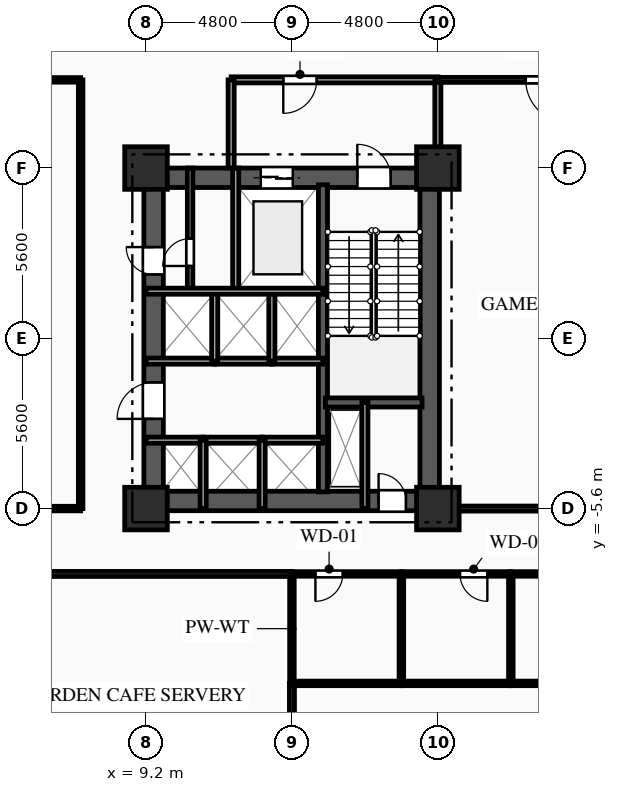
"""IFC4 building model, lengths in metres.
Left out: names, types, materials, properties, quantities, classifications, styles, units other than length and angle.
Written with IfcOpenShell. Run it as: python <this file> out.ifc"""

import sys

from ifc_helpers import new_model, si_unit, direction, frame, frame_2d, origin, origin_2d, place, context, subcontext, project, spatial, rectangle, extrude, element, fill, save


model = new_model("IFC4")
c1 = context("Model", 3, precision=1e-05, world=origin(), true_north=direction((0.0, 1.0)))
c2 = subcontext(c1, "Body", "Model", "MODEL_VIEW")
j1 = project(units=[si_unit("LENGTHUNIT", "METRE"), si_unit("PLANEANGLEUNIT", "RADIAN")], contexts=[c1])
p1 = place(None, origin())
s1 = spatial("IfcSite", under=j1, at=p1, CompositionType="ELEMENT")
p2 = place(p1, origin())
s2 = spatial("IfcBuilding", under=s1, at=p2, CompositionType="ELEMENT")
p3 = place(p2, frame((0.0, 0.0, 13.5)))
s3 = spatial("IfcBuildingStorey", under=s2, at=p3, CompositionType="ELEMENT", Elevation=13.5)
for number, where, z_axis, x_axis in (
    (1, (9.2, -5.6, 0.0), (0.0, 0.0, 1.0), (1.0, 0.0, 0.0)),
    (2, (9.2, 5.6, 0.0), (0.0, 0.0, 1.0), (1.0, 0.0, 0.0)),
    (3, (18.8, -5.6, 0.0), (0.0, 0.0, 1.0), (1.0, 0.0, 0.0)),
    (4, (18.8, 5.6, 0.0), (0.0, 0.0, 1.0), (1.0, 0.0, 0.0)),
):
    element("IfcColumn", number, at=place(p3, frame(where, z_axis=z_axis, x_axis=x_axis)), inside=s3, PredefinedType="COLUMN", context=c2, shape_type="SweptSolid", body=[
        extrude(rectangle(XDim=1.4, YDim=1.4, at=origin_2d()), origin(), (0.0, 0.0, 1.0), 4.5),
    ])
p4 = place(p3, frame((9.2, 5.28, 0.0), z_axis=(0.0, 0.0, 1.0), x_axis=(1.0, 0.0, 0.0)))
e5 = element("IfcWall", 5, at=p4, inside=s3, PredefinedType="SHEAR", context=c2, shape_type="SweptSolid", body=[
    extrude(rectangle(XDim=9.6, YDim=0.64, at=frame_2d((4.8, 0.0))), origin(), (0.0, 0.0, 1.0), 4.17),
])
p5 = place(p4, frame((6.95, 0.0, 0.0)))
e6 = element("IfcOpeningElement", 6, at=p5, cuts=e5, PredefinedType="OPENING", context=c2, shape_type="SweptSolid", body=[
    extrude(rectangle(XDim=1.1, YDim=2.15, at=frame_2d((0.55, 1.075))), frame((0.0, 0.33, 0.0), z_axis=(0.0, -1.0, 0.0), x_axis=(1.0, 0.0, 0.0)), (0.0, 0.0, 1.0), 0.66),
])
p6 = place(p4, frame((3.775, 0.0, 0.0)))
e7 = element("IfcOpeningElement", 7, at=p6, cuts=e5, PredefinedType="OPENING", context=c2, shape_type="SweptSolid", body=[
    extrude(rectangle(XDim=1.05, YDim=2.1, at=frame_2d((0.525, 1.05))), frame((0.0, 0.33, 0.0), z_axis=(0.0, -1.0, 0.0), x_axis=(1.0, 0.0, 0.0)), (0.0, 0.0, 1.0), 0.66),
])
p7 = place(p3, frame((9.2, -5.35, 0.0), z_axis=(0.0, 0.0, 1.0), x_axis=(1.0, 0.0, 0.0)))
e8 = element("IfcWall", 8, at=p7, inside=s3, PredefinedType="SHEAR", context=c2, shape_type="SweptSolid", body=[
    extrude(rectangle(XDim=9.6, YDim=0.64, at=frame_2d((4.8, 0.0))), origin(), (0.0, 0.0, 1.0), 4.17),
])
p8 = place(p7, frame((7.65, 0.0, 0.0)))
e9 = element("IfcOpeningElement", 9, at=p8, cuts=e8, PredefinedType="OPENING", context=c2, shape_type="SweptSolid", body=[
    extrude(rectangle(XDim=0.9, YDim=2.1, at=frame_2d((0.45, 1.05))), frame((0.0, 0.33, 0.0), z_axis=(0.0, -1.0, 0.0), x_axis=(1.0, 0.0, 0.0)), (0.0, 0.0, 1.0), 0.66),
])
p9 = place(p3, frame((9.45, -5.05, 0.0), z_axis=(0.0, 0.0, 1.0), x_axis=(0.0, 1.0, 0.0)))
e10 = element("IfcWall", 10, at=p9, inside=s3, PredefinedType="SHEAR", context=c2, shape_type="SweptSolid", body=[
    extrude(rectangle(XDim=10.1, YDim=0.64, at=frame_2d((5.05, 0.0))), origin(), (0.0, 0.0, 1.0), 4.17),
])
p10 = place(p9, frame((7.15, 0.0, 0.0)))
e11 = element("IfcOpeningElement", 11, at=p10, cuts=e10, PredefinedType="OPENING", context=c2, shape_type="SweptSolid", body=[
    extrude(rectangle(XDim=0.9, YDim=2.1, at=frame_2d((0.45, 1.05))), frame((0.0, 0.33, 0.0), z_axis=(0.0, -1.0, 0.0), x_axis=(1.0, 0.0, 0.0)), (0.0, 0.0, 1.0), 0.66),
])
p11 = place(p9, frame((2.4, 0.0, 0.0)))
e12 = element("IfcOpeningElement", 12, at=p11, cuts=e10, PredefinedType="OPENING", context=c2, shape_type="SweptSolid", body=[
    extrude(rectangle(XDim=1.2, YDim=2.15, at=frame_2d((0.6, 1.075))), frame((0.0, 0.33, 0.0), z_axis=(0.0, -1.0, 0.0), x_axis=(1.0, 0.0, 0.0)), (0.0, 0.0, 1.0), 0.66),
])
p12 = place(p3, frame((18.53, -5.05, 0.0), z_axis=(0.0, 0.0, 1.0), x_axis=(0.0, 1.0, 0.0)))
e13 = element("IfcWall", 13, at=p12, inside=s3, PredefinedType="SHEAR", context=c2, shape_type="SweptSolid", body=[
    extrude(rectangle(XDim=10.1, YDim=0.64, at=frame_2d((5.05, 0.0))), origin(), (0.0, 0.0, 1.0), 4.17),
])
p13 = place(p3, frame((15.02, -5.05, 0.0), z_axis=(0.0, 0.0, 1.0), x_axis=(0.0, 1.0, 0.0)))
e14 = element("IfcWall", 14, at=p13, inside=s3, PredefinedType="SHEAR", context=c2, shape_type="SweptSolid", body=[
    extrude(rectangle(XDim=10.1, YDim=0.3, at=frame_2d((5.05, 0.0))), origin(), (0.0, 0.0, 1.0), 4.17),
])
p14 = place(p3, frame((15.1, -2.11, 0.0), z_axis=(0.0, 0.0, 1.0), x_axis=(1.0, 0.0, 0.0)))
e15 = element("IfcWall", 15, at=p14, inside=s3, PredefinedType="SHEAR", context=c2, shape_type="SweptSolid", body=[
    extrude(rectangle(XDim=3.18, YDim=0.3, at=frame_2d((1.59, 0.0))), origin(), (0.0, 0.0, 1.0), 4.17),
])
p15 = place(p3, frame((16.4, -2.11, 0.0), z_axis=(0.0, 0.0, 1.0), x_axis=(0.0, -1.0, 0.0)))
e16 = element("IfcWall", 16, at=p15, inside=s3, PredefinedType="PARTITIONING", context=c2, shape_type="SweptSolid", body=[
    extrude(rectangle(XDim=3.49, YDim=0.2, at=frame_2d((1.745, 0.0))), origin(), (0.0, 0.0, 1.0), 4.17),
])
p16 = place(p3, frame((12.15, 5.6, 0.0), z_axis=(0.0, 0.0, 1.0), x_axis=(0.0, -1.0, 0.0)))
e17 = element("IfcWall", 17, at=p16, inside=s3, PredefinedType="PARTITIONING", context=c2, shape_type="SweptSolid", body=[
    extrude(rectangle(XDim=4.05, YDim=0.2, at=frame_2d((2.025, 0.0))), origin(), (0.0, 0.0, 1.0), 4.17),
])
p17 = place(p3, frame((18.8, 8.5, 0.0), z_axis=(0.0, 0.0, 1.0), x_axis=(-1.0, 0.0, 0.0)))
e18 = element("IfcWall", 18, at=p17, inside=s3, PredefinedType="PARTITIONING", context=c2, shape_type="SweptSolid", body=[
    extrude(rectangle(XDim=6.8, YDim=0.2, at=frame_2d((3.4, 0.0))), origin(), (0.0, 0.0, 1.0), 4.17),
])
p18 = place(p17, frame((3.985, 0.0, 0.0)))
e19 = element("IfcOpeningElement", 19, at=p18, cuts=e18, PredefinedType="OPENING", context=c2, shape_type="SweptSolid", body=[
    extrude(rectangle(XDim=1.1, YDim=2.15, at=frame_2d((0.55, 1.075))), frame((0.0, 0.11, 0.0), z_axis=(0.0, -1.0, 0.0), x_axis=(1.0, 0.0, 0.0)), (0.0, 0.0, 1.0), 0.22),
])
p19 = place(p3, frame((12.0, 8.5, 0.0), z_axis=(0.0, 0.0, 1.0), x_axis=(0.0, -1.0, 0.0)))
e20 = element("IfcWall", 20, at=p19, inside=s3, PredefinedType="PARTITIONING", context=c2, shape_type="SweptSolid", body=[
    extrude(rectangle(XDim=2.9, YDim=0.2, at=frame_2d((1.45, 0.0))), origin(), (0.0, 0.0, 1.0), 4.17),
])
p20 = place(p3, frame((18.8, 5.6, 0.0), z_axis=(0.0, 0.0, 1.0), x_axis=(0.0, 1.0, 0.0)))
e21 = element("IfcWall", 21, at=p20, inside=s3, PredefinedType="PARTITIONING", context=c2, shape_type="SweptSolid", body=[
    extrude(rectangle(XDim=2.9, YDim=0.2, at=frame_2d((1.45, 0.0))), origin(), (0.0, 0.0, 1.0), 3.655),
])
p21 = place(p3, frame((10.65, 1.55, 0.0), z_axis=(0.0, 0.0, 1.0), x_axis=(0.0, 1.0, 0.0)))
e22 = element("IfcWall", 22, at=p21, inside=s3, PredefinedType="PARTITIONING", context=c2, shape_type="SweptSolid", body=[
    extrude(rectangle(XDim=4.05, YDim=0.18, at=frame_2d((2.025, 0.0))), origin(), (0.0, 0.0, 1.0), 4.17),
])
p22 = place(p21, frame((0.829, 0.0, 0.0)))
e23 = element("IfcOpeningElement", 23, at=p22, cuts=e22, PredefinedType="OPENING", context=c2, shape_type="SweptSolid", body=[
    extrude(rectangle(XDim=0.9, YDim=2.1, at=frame_2d((0.45, 1.05))), frame((0.0, 0.1, 0.0), z_axis=(0.0, -1.0, 0.0), x_axis=(1.0, 0.0, 0.0)), (0.0, 0.0, 1.0), 0.2),
])
p23 = place(p3, frame((9.2, -3.35, 0.0), z_axis=(0.0, 0.0, 1.0), x_axis=(1.0, 0.0, 0.0)))
e24 = element("IfcWall", 24, at=p23, inside=s3, PredefinedType="PARTITIONING", context=c2, shape_type="SweptSolid", body=[
    extrude(rectangle(XDim=1.88, YDim=0.2, at=frame_2d((0.94, 0.0))), origin(), (0.0, 0.0, 1.0), 3.885),
])
p24 = place(p3, frame((11.08, -3.35, 0.0), z_axis=(0.0, 0.0, 1.0), x_axis=(1.0, 0.0, 0.0)))
e25 = element("IfcWall", 25, at=p24, inside=s3, PredefinedType="PARTITIONING", context=c2, shape_type="SweptSolid", body=[
    extrude(rectangle(XDim=1.94, YDim=0.2, at=frame_2d((0.97, 0.0))), origin(), (0.0, 0.0, 1.0), 4.17),
])
p25 = place(p3, frame((13.02, -3.35, 0.0), z_axis=(0.0, 0.0, 1.0), x_axis=(1.0, 0.0, 0.0)))
e26 = element("IfcWall", 26, at=p25, inside=s3, PredefinedType="PARTITIONING", context=c2, shape_type="SweptSolid", body=[
    extrude(rectangle(XDim=2.0, YDim=0.2, at=frame_2d((1.0, 0.0))), origin(), (0.0, 0.0, 1.0), 4.17),
])
p26 = place(p3, frame((11.46, -0.75, 0.0), z_axis=(0.0, 0.0, 1.0), x_axis=(-1.0, 0.0, 0.0)))
e27 = element("IfcWall", 27, at=p26, inside=s3, PredefinedType="PARTITIONING", context=c2, shape_type="SweptSolid", body=[
    extrude(rectangle(XDim=2.26, YDim=0.2, at=frame_2d((1.13, 0.0))), origin(), (0.0, 0.0, 1.0), 4.17),
])
p27 = place(p3, frame((13.34, -0.75, 0.0), z_axis=(0.0, 0.0, 1.0), x_axis=(-1.0, 0.0, 0.0)))
e28 = element("IfcWall", 28, at=p27, inside=s3, PredefinedType="PARTITIONING", context=c2, shape_type="SweptSolid", body=[
    extrude(rectangle(XDim=1.88, YDim=0.2, at=frame_2d((0.94, 0.0))), origin(), (0.0, 0.0, 1.0), 4.17),
])
p28 = place(p3, frame((15.02, -0.75, 0.0), z_axis=(0.0, 0.0, 1.0), x_axis=(-1.0, 0.0, 0.0)))
e29 = element("IfcWall", 29, at=p28, inside=s3, PredefinedType="PARTITIONING", context=c2, shape_type="SweptSolid", body=[
    extrude(rectangle(XDim=1.68, YDim=0.2, at=frame_2d((0.84, 0.0))), origin(), (0.0, 0.0, 1.0), 4.17),
])
for number, where, z_axis, x_axis in (
    (30, (11.08, -5.6, 0.0), (0.0, 0.0, 1.0), (0.0, 1.0, 0.0)),
    (31, (13.02, -5.6, 0.0), (0.0, 0.0, 1.0), (0.0, 1.0, 0.0)),
):
    element("IfcWall", number, at=place(p3, frame(where, z_axis=z_axis, x_axis=x_axis)), inside=s3, PredefinedType="PARTITIONING", context=c2, shape_type="SweptSolid", body=[
        extrude(rectangle(XDim=2.25, YDim=0.2, at=frame_2d((1.125, 0.0))), origin(), (0.0, 0.0, 1.0), 4.17),
    ])
for number, where, z_axis, x_axis in (
    (32, (11.46, -0.75, 0.0), (0.0, 0.0, 1.0), (0.0, 1.0, 0.0)),
    (33, (13.34, -0.75, 0.0), (0.0, 0.0, 1.0), (0.0, 1.0, 0.0)),
):
    element("IfcWall", number, at=place(p3, frame(where, z_axis=z_axis, x_axis=x_axis)), inside=s3, PredefinedType="PARTITIONING", context=c2, shape_type="SweptSolid", body=[
        extrude(rectangle(XDim=2.3, YDim=0.2, at=frame_2d((1.15, 0.0))), origin(), (0.0, 0.0, 1.0), 4.17),
    ])
p29 = place(p3, frame((7.05, 8.5, 0.0), z_axis=(0.0, 0.0, 1.0), x_axis=(-1.0, 0.0, 0.0)))
e34 = element("IfcWall", 34, at=p29, inside=s3, PredefinedType="PARTITIONING", context=c2, shape_type="SweptSolid", body=[
    extrude(rectangle(XDim=7.05, YDim=0.15, at=frame_2d((3.525, 0.0))), origin(), (0.0, 0.0, 1.0), 4.17),
])
p30 = place(p3, frame((24.0, 8.5, 0.0), z_axis=(0.0, 0.0, 1.0), x_axis=(-1.0, 0.0, 0.0)))
e35 = element("IfcWall", 35, at=p30, inside=s3, PredefinedType="PARTITIONING", context=c2, shape_type="SweptSolid", body=[
    extrude(rectangle(XDim=5.2, YDim=0.165, at=frame_2d((2.6, 0.0))), origin(), (0.0, 0.0, 1.0), 4.17),
])
p31 = place(p30, frame((0.91, 0.0, 0.0)))
e36 = element("IfcOpeningElement", 36, at=p31, cuts=e35, PredefinedType="OPENING", context=c2, shape_type="SweptSolid", body=[
    extrude(rectangle(XDim=1.4, YDim=2.3, at=frame_2d((0.7, 1.15))), frame((0.0, 0.093, 0.0), z_axis=(0.0, -1.0, 0.0), x_axis=(1.0, 0.0, 0.0)), (0.0, 0.0, 1.0), 0.185),
])
p32 = place(p3, frame((14.0, -7.75, 0.0), z_axis=(0.0, 0.0, 1.0), x_axis=(-1.0, 0.0, 0.0)))
e37 = element("IfcWall", 37, at=p32, inside=s3, PredefinedType="PARTITIONING", context=c2, shape_type="SweptSolid", body=[
    extrude(rectangle(XDim=14.0, YDim=0.165, at=frame_2d((7.0, 0.0))), origin(), (0.0, 0.0, 1.0), 4.17),
])
p33 = place(p32, frame((10.809, 0.0, 0.0)))
e38 = element("IfcOpeningElement", 38, at=p33, cuts=e37, PredefinedType="OPENING", context=c2, shape_type="SweptSolid", body=[
    extrude(rectangle(XDim=1.15, YDim=2.15, at=frame_2d((0.575, 1.075))), frame((0.0, 0.093, 0.0), z_axis=(0.0, -1.0, 0.0), x_axis=(1.0, 0.0, 0.0)), (0.0, 0.0, 1.0), 0.185),
])
p34 = place(p3, frame((17.6, -7.75, 0.0), z_axis=(0.0, 0.0, 1.0), x_axis=(-1.0, 0.0, 0.0)))
e39 = element("IfcWall", 39, at=p34, inside=s3, PredefinedType="PLUMBINGWALL", context=c2, shape_type="SweptSolid", body=[
    extrude(rectangle(XDim=3.6, YDim=0.15, at=frame_2d((1.8, 0.0))), origin(), (0.0, 0.0, 1.0), 4.17),
])
p35 = place(p34, frame((1.927, 0.0, 0.0)))
e40 = element("IfcOpeningElement", 40, at=p35, cuts=e39, PredefinedType="OPENING", context=c2, shape_type="SweptSolid", body=[
    extrude(rectangle(XDim=0.9, YDim=2.1, at=frame_2d((0.45, 1.05))), frame((0.0, 0.085, 0.0), z_axis=(0.0, -1.0, 0.0), x_axis=(1.0, 0.0, 0.0)), (0.0, 0.0, 1.0), 0.17),
])
p36 = place(p3, frame((21.2, -7.75, 0.0), z_axis=(0.0, 0.0, 1.0), x_axis=(-1.0, 0.0, 0.0)))
e41 = element("IfcWall", 41, at=p36, inside=s3, PredefinedType="PLUMBINGWALL", context=c2, shape_type="SweptSolid", body=[
    extrude(rectangle(XDim=3.6, YDim=0.15, at=frame_2d((1.8, 0.0))), origin(), (0.0, 0.0, 1.0), 4.17),
])
p37 = place(p36, frame((0.772, 0.0, 0.0)))
e42 = element("IfcOpeningElement", 42, at=p37, cuts=e41, PredefinedType="OPENING", context=c2, shape_type="SweptSolid", body=[
    extrude(rectangle(XDim=0.9, YDim=2.1, at=frame_2d((0.45, 1.05))), frame((0.0, 0.085, 0.0), z_axis=(0.0, -1.0, 0.0), x_axis=(1.0, 0.0, 0.0)), (0.0, 0.0, 1.0), 0.17),
])
p38 = place(p3, frame((24.0, -7.75, 0.0), z_axis=(0.0, 0.0, 1.0), x_axis=(-1.0, 0.0, 0.0)))
e43 = element("IfcWall", 43, at=p38, inside=s3, PredefinedType="PARTITIONING", context=c2, shape_type="SweptSolid", body=[
    extrude(rectangle(XDim=2.8, YDim=0.15, at=frame_2d((1.4, 0.0))), origin(), (0.0, 0.0, 1.0), 4.17),
])
p39 = place(p38, frame((0.666, 0.0, 0.0)))
e44 = element("IfcOpeningElement", 44, at=p39, cuts=e43, PredefinedType="OPENING", context=c2, shape_type="SweptSolid", body=[
    extrude(rectangle(XDim=0.95, YDim=2.1, at=frame_2d((0.475, 1.05))), frame((0.0, 0.085, 0.0), z_axis=(0.0, -1.0, 0.0), x_axis=(1.0, 0.0, 0.0)), (0.0, 0.0, 1.0), 0.17),
])
p40 = place(p3, frame((0.0, -5.6, 0.0), z_axis=(0.0, 0.0, 1.0), x_axis=(1.0, 0.0, 0.0)))
e45 = element("IfcWall", 45, at=p40, inside=s3, PredefinedType="PARTITIONING", context=c2, shape_type="SweptSolid", body=[
    extrude(rectangle(XDim=7.05, YDim=0.15, at=frame_2d((3.525, 0.0))), origin(), (0.0, 0.0, 1.0), 3.655),
])
p41 = place(p3, frame((18.8, -5.6, 0.0), z_axis=(0.0, 0.0, 1.0), x_axis=(1.0, 0.0, 0.0)))
e46 = element("IfcWall", 46, at=p41, inside=s3, PredefinedType="PARTITIONING", context=c2, shape_type="SweptSolid", body=[
    extrude(rectangle(XDim=5.2, YDim=0.165, at=frame_2d((2.6, 0.0))), origin(), (0.0, 0.0, 1.0), 4.17),
])
p42 = place(p3, frame((7.05, -5.6, 0.0), z_axis=(0.0, 0.0, 1.0), x_axis=(0.0, 1.0, 0.0)))
e47 = element("IfcWall", 47, at=p42, inside=s3, PredefinedType="PARTITIONING", context=c2, shape_type="SweptSolid", body=[
    extrude(rectangle(XDim=14.1, YDim=0.15, at=frame_2d((7.05, 0.0))), origin(), (0.0, 0.0, 1.0), 4.17),
])
p43 = place(p3, frame((14.0, -7.75, 0.0), z_axis=(0.0, 0.0, 1.0), x_axis=(0.0, -1.0, 0.0)))
e48 = element("IfcWall", 48, at=p43, inside=s3, PredefinedType="PLUMBINGWALL", context=c2, shape_type="SweptSolid", body=[
    extrude(rectangle(XDim=3.6, YDim=0.15, at=frame_2d((1.8, 0.0))), origin(), (0.0, 0.0, 1.0), 4.17),
])
p44 = place(p3, frame((14.0, -11.35, 0.0), z_axis=(0.0, 0.0, 1.0), x_axis=(0.0, -1.0, 0.0)))
e49 = element("IfcWall", 49, at=p44, inside=s3, PredefinedType="PARTITIONING", context=c2, shape_type="SweptSolid", body=[
    extrude(rectangle(XDim=10.45, YDim=0.165, at=frame_2d((5.225, 0.0))), origin(), (0.0, 0.0, 1.0), 4.17),
])
for number, where, z_axis, x_axis in (
    (50, (17.6, -7.75, 0.0), (0.0, 0.0, 1.0), (0.0, -1.0, 0.0)),
    (51, (17.6, -11.35, 0.0), (0.0, 0.0, 1.0), (-1.0, 0.0, 0.0)),
    (52, (21.2, -7.75, 0.0), (0.0, 0.0, 1.0), (0.0, -1.0, 0.0)),
):
    element("IfcWall", number, at=place(p3, frame(where, z_axis=z_axis, x_axis=x_axis)), inside=s3, PredefinedType="PLUMBINGWALL", context=c2, shape_type="SweptSolid", body=[
        extrude(rectangle(XDim=3.6, YDim=0.15, at=frame_2d((1.8, 0.0))), origin(), (0.0, 0.0, 1.0), 4.17),
    ])
p45 = place(p3, frame((21.2, -11.35, 0.0), z_axis=(0.0, 0.0, 1.0), x_axis=(-1.0, 0.0, 0.0)))
e53 = element("IfcWall", 53, at=p45, inside=s3, PredefinedType="PLUMBINGWALL", context=c2, shape_type="SweptSolid", body=[
    extrude(rectangle(XDim=3.6, YDim=0.15, at=frame_2d((1.8, 0.0))), origin(), (0.0, 0.0, 1.0), 4.17),
])
p46 = place(p3, frame((24.0, -11.35, 0.0), z_axis=(0.0, 0.0, 1.0), x_axis=(-1.0, 0.0, 0.0)))
e54 = element("IfcWall", 54, at=p46, inside=s3, PredefinedType="PARTITIONING", context=c2, shape_type="SweptSolid", body=[
    extrude(rectangle(XDim=2.8, YDim=0.15, at=frame_2d((1.4, 0.0))), origin(), (0.0, 0.0, 1.0), 4.17),
])
p47 = place(p46, frame((0.666, 0.0, 0.0)))
e55 = element("IfcOpeningElement", 55, at=p47, cuts=e54, PredefinedType="OPENING", context=c2, shape_type="SweptSolid", body=[
    extrude(rectangle(XDim=0.95, YDim=2.1, at=frame_2d((0.475, 1.05))), frame((0.0, 0.085, 0.0), z_axis=(0.0, -1.0, 0.0), x_axis=(1.0, 0.0, 0.0)), (0.0, 0.0, 1.0), 0.17),
])
p48 = place(p3, frame((9.2, 1.55, 0.0), z_axis=(0.0, 0.0, 1.0), x_axis=(1.0, 0.0, 0.0)))
e56 = element("IfcWall", 56, at=p48, inside=s3, PredefinedType="PARTITIONING", context=c2, shape_type="SweptSolid", body=[
    extrude(rectangle(XDim=5.82, YDim=0.2, at=frame_2d((2.91, 0.0))), origin(), (0.0, 0.0, 1.0), 4.17),
])
p49 = place(p5, origin())
e57 = element("IfcDoor", 57, at=p49, inside=s3, OperationType="SINGLE_SWING_LEFT", PredefinedType="DOOR", context=c2, shape_type="SweptSolid", body=[
    extrude(rectangle(XDim=1.1, YDim=2.15, at=frame_2d((0.55, 1.075))), frame((0.0, 0.025, 0.0), z_axis=(0.0, -1.0, 0.0), x_axis=(1.0, 0.0, 0.0)), (0.0, 0.0, 1.0), 0.05),
])
fill(e6, e57)
p50 = place(p6, origin())
e58 = element("IfcDoor", 58, at=p50, inside=s3, OperationType="DOUBLE_DOOR_SLIDING", PredefinedType="DOOR", context=c2, shape_type="SweptSolid", body=[
    extrude(rectangle(XDim=1.05, YDim=2.1, at=frame_2d((0.525, 1.05))), frame((0.0, 0.025, 0.0), z_axis=(0.0, -1.0, 0.0), x_axis=(1.0, 0.0, 0.0)), (0.0, 0.0, 1.0), 0.05),
])
fill(e7, e58)
p51 = place(p8, origin())
e59 = element("IfcDoor", 59, at=p51, inside=s3, OperationType="SINGLE_SWING_LEFT", PredefinedType="DOOR", context=c2, shape_type="SweptSolid", body=[
    extrude(rectangle(XDim=0.9, YDim=2.1, at=frame_2d((0.45, 1.05))), frame((0.0, 0.025, 0.0), z_axis=(0.0, -1.0, 0.0), x_axis=(1.0, 0.0, 0.0)), (0.0, 0.0, 1.0), 0.05),
])
fill(e9, e59)
p52 = place(p18, origin())
e60 = element("IfcDoor", 60, at=p52, inside=s3, OperationType="SINGLE_SWING_RIGHT", PredefinedType="DOOR", context=c2, shape_type="SweptSolid", body=[
    extrude(rectangle(XDim=1.1, YDim=2.15, at=frame_2d((0.55, 1.075))), frame((0.0, 0.025, 0.0), z_axis=(0.0, -1.0, 0.0), x_axis=(1.0, 0.0, 0.0)), (0.0, 0.0, 1.0), 0.05),
])
fill(e19, e60)
p53 = place(p22, origin())
e61 = element("IfcDoor", 61, at=p53, inside=s3, OperationType="SINGLE_SWING_LEFT", PredefinedType="DOOR", context=c2, shape_type="SweptSolid", body=[
    extrude(rectangle(XDim=0.9, YDim=2.1, at=frame_2d((0.45, 1.05))), frame((0.0, 0.025, 0.0), z_axis=(0.0, -1.0, 0.0), x_axis=(1.0, 0.0, 0.0)), (0.0, 0.0, 1.0), 0.05),
])
fill(e23, e61)
p54 = place(p10, origin())
e62 = element("IfcDoor", 62, at=p54, inside=s3, OperationType="SINGLE_SWING_RIGHT", PredefinedType="DOOR", context=c2, shape_type="SweptSolid", body=[
    extrude(rectangle(XDim=0.9, YDim=2.1, at=frame_2d((0.45, 1.05))), frame((0.0, 0.025, 0.0), z_axis=(0.0, -1.0, 0.0), x_axis=(1.0, 0.0, 0.0)), (0.0, 0.0, 1.0), 0.05),
])
fill(e11, e62)
p55 = place(p11, origin())
e63 = element("IfcDoor", 63, at=p55, inside=s3, OperationType="SINGLE_SWING_LEFT", PredefinedType="DOOR", context=c2, shape_type="SweptSolid", body=[
    extrude(rectangle(XDim=1.2, YDim=2.15, at=frame_2d((0.6, 1.075))), frame((0.0, 0.025, 0.0), z_axis=(0.0, -1.0, 0.0), x_axis=(1.0, 0.0, 0.0)), (0.0, 0.0, 1.0), 0.05),
])
fill(e12, e63)
p56 = place(p31, origin())
e64 = element("IfcDoor", 64, at=p56, inside=s3, OperationType="SINGLE_SWING_LEFT", PredefinedType="DOOR", context=c2, shape_type="SweptSolid", body=[
    extrude(rectangle(XDim=1.4, YDim=2.3, at=frame_2d((0.7, 1.15))), frame((0.0, 0.025, 0.0), z_axis=(0.0, -1.0, 0.0), x_axis=(1.0, 0.0, 0.0)), (0.0, 0.0, 1.0), 0.05),
])
fill(e36, e64)
p57 = place(p35, origin())
e65 = element("IfcDoor", 65, at=p57, inside=s3, OperationType="SINGLE_SWING_RIGHT", PredefinedType="DOOR", context=c2, shape_type="SweptSolid", body=[
    extrude(rectangle(XDim=0.9, YDim=2.1, at=frame_2d((0.45, 1.05))), frame((0.0, 0.025, 0.0), z_axis=(0.0, -1.0, 0.0), x_axis=(1.0, 0.0, 0.0)), (0.0, 0.0, 1.0), 0.05),
])
fill(e40, e65)
p58 = place(p37, origin())
e66 = element("IfcDoor", 66, at=p58, inside=s3, OperationType="SINGLE_SWING_LEFT", PredefinedType="DOOR", context=c2, shape_type="SweptSolid", body=[
    extrude(rectangle(XDim=0.9, YDim=2.1, at=frame_2d((0.45, 1.05))), frame((0.0, 0.025, 0.0), z_axis=(0.0, -1.0, 0.0), x_axis=(1.0, 0.0, 0.0)), (0.0, 0.0, 1.0), 0.05),
])
fill(e42, e66)
save(model, sys.argv[1])
